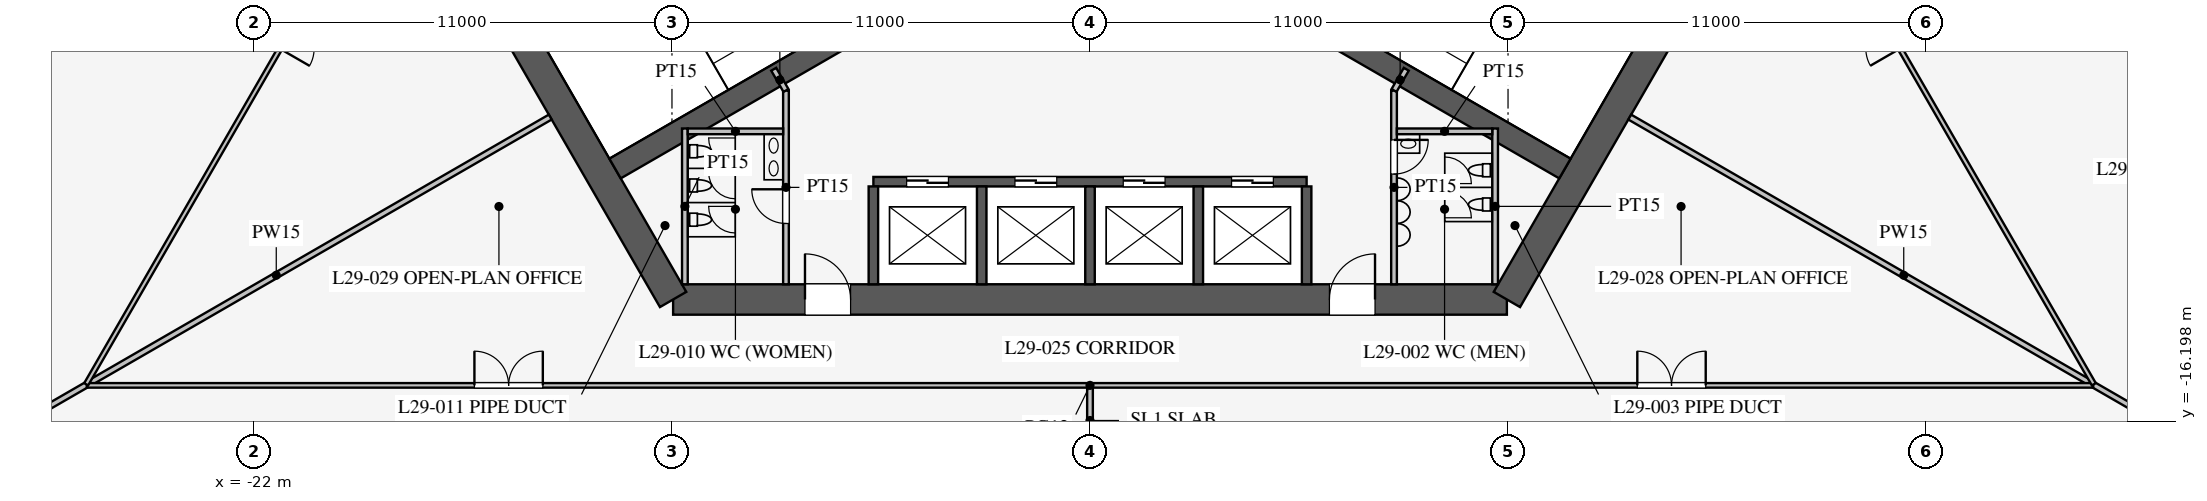
"""IFC4 building model, lengths in metres.
Left out: names, types, materials, properties, quantities, classifications, styles, units other than length and angle.
Written with IfcOpenShell. Run it as: python <this file> out.ifc"""

import sys

from ifc_helpers import new_model, si_unit, direction, frame, frame_2d, origin, place, context, subcontext, project, spatial, rectangle, extrude, element, fill, save


model = new_model("IFC4")
c1 = context("Model", 3, precision=1e-05, world=origin(), true_north=direction((0.0, 1.0)))
c2 = subcontext(c1, "Body", "Model", "MODEL_VIEW")
j1 = project(units=[si_unit("LENGTHUNIT", "METRE"), si_unit("PLANEANGLEUNIT", "RADIAN")], contexts=[c1])
p1 = place(None, origin())
s1 = spatial("IfcSite", under=j1, at=p1, CompositionType="ELEMENT")
p2 = place(p1, origin())
s2 = spatial("IfcBuilding", under=s1, at=p2, CompositionType="ELEMENT")
p3 = place(p2, frame((0.0, 0.0, 128.3)))
s3 = spatial("IfcBuildingStorey", under=s2, at=p3, CompositionType="ELEMENT", Elevation=128.3)
p4 = place(p3, frame((-10.97, -13.0, 0.0), z_axis=(0.0, 0.0, 1.0), x_axis=(1.0, 0.0, 0.0)))
e1 = element("IfcWall", 1, at=p4, inside=s3, PredefinedType="SHEAR", context=c2, shape_type="SweptSolid", body=[
    extrude(rectangle(XDim=21.939, YDim=0.8, at=frame_2d((10.97, 0.0))), origin(), (0.0, 0.0, 1.0), 4.2),
])
p5 = place(p4, frame((17.27, 0.0, 0.0)))
e2 = element("IfcOpeningElement", 2, at=p5, cuts=e1, PredefinedType="OPENING", context=c2, shape_type="SweptSolid", body=[
    extrude(rectangle(XDim=1.2, YDim=2.1, at=frame_2d((0.6, 1.05))), frame((0.0, 0.41, 0.0), z_axis=(0.0, -1.0, 0.0), x_axis=(1.0, 0.0, 0.0)), (0.0, 0.0, 1.0), 0.82),
])
p6 = place(p4, frame((3.47, 0.0, 0.0)))
e3 = element("IfcOpeningElement", 3, at=p6, cuts=e1, PredefinedType="OPENING", context=c2, shape_type="SweptSolid", body=[
    extrude(rectangle(XDim=1.2, YDim=2.1, at=frame_2d((0.6, 1.05))), frame((0.0, 0.41, 0.0), z_axis=(0.0, -1.0, 0.0), x_axis=(1.0, 0.0, 0.0)), (0.0, 0.0, 1.0), 0.82),
])
for number, where, z_axis, x_axis in (
    (4, (10.97, -13.0, 0.0), (0.0, 0.0, 1.0), (0.5, 0.866, 0.0)),
    (5, (-16.743, -3.0, 0.0), (0.0, 0.0, 1.0), (0.5, -0.866, 0.0)),
):
    element("IfcWall", number, at=place(p3, frame(where, z_axis=z_axis, x_axis=x_axis)), inside=s3, PredefinedType="SHEAR", context=c2, shape_type="SweptSolid", body=[
        extrude(rectangle(XDim=11.547, YDim=0.8, at=frame_2d((5.773, 0.0))), origin(), (0.0, 0.0, 1.0), 4.2),
    ])
p7 = place(p3, frame((-5.7, -9.9, 0.0), z_axis=(0.0, 0.0, 1.0), x_axis=(1.0, 0.0, 0.0)))
e6 = element("IfcWall", 6, at=p7, inside=s3, PredefinedType="SHEAR", context=c2, shape_type="SweptSolid", body=[
    extrude(rectangle(XDim=11.4, YDim=0.25, at=frame_2d((5.7, 0.0))), origin(), (0.0, 0.0, 1.0), 4.2),
])
p8 = place(p7, frame((0.875, 0.0, 0.0)))
e7 = element("IfcOpeningElement", 7, at=p8, cuts=e6, PredefinedType="OPENING", context=c2, shape_type="SweptSolid", body=[
    extrude(rectangle(XDim=1.1, YDim=2.2, at=frame_2d((0.55, 1.1))), frame((0.0, 0.135, 0.0), z_axis=(0.0, -1.0, 0.0), x_axis=(1.0, 0.0, 0.0)), (0.0, 0.0, 1.0), 0.27),
])
p9 = place(p7, frame((3.725, 0.0, 0.0)))
e8 = element("IfcOpeningElement", 8, at=p9, cuts=e6, PredefinedType="OPENING", context=c2, shape_type="SweptSolid", body=[
    extrude(rectangle(XDim=1.1, YDim=2.2, at=frame_2d((0.55, 1.1))), frame((0.0, 0.135, 0.0), z_axis=(0.0, -1.0, 0.0), x_axis=(1.0, 0.0, 0.0)), (0.0, 0.0, 1.0), 0.27),
])
p10 = place(p7, frame((6.575, 0.0, 0.0)))
e9 = element("IfcOpeningElement", 9, at=p10, cuts=e6, PredefinedType="OPENING", context=c2, shape_type="SweptSolid", body=[
    extrude(rectangle(XDim=1.1, YDim=2.2, at=frame_2d((0.55, 1.1))), frame((0.0, 0.135, 0.0), z_axis=(0.0, -1.0, 0.0), x_axis=(1.0, 0.0, 0.0)), (0.0, 0.0, 1.0), 0.27),
])
p11 = place(p7, frame((9.425, 0.0, 0.0)))
e10 = element("IfcOpeningElement", 10, at=p11, cuts=e6, PredefinedType="OPENING", context=c2, shape_type="SweptSolid", body=[
    extrude(rectangle(XDim=1.1, YDim=2.2, at=frame_2d((0.55, 1.1))), frame((0.0, 0.135, 0.0), z_axis=(0.0, -1.0, 0.0), x_axis=(1.0, 0.0, 0.0)), (0.0, 0.0, 1.0), 0.27),
])
for number, where, z_axis, x_axis in (
    (11, (-5.7, -10.025, 0.0), (0.0, 0.0, 1.0), (0.0, -1.0, 0.0)),
    (12, (-2.85, -10.025, 0.0), (0.0, 0.0, 1.0), (0.0, -1.0, 0.0)),
    (13, (0.0, -10.025, 0.0), (0.0, 0.0, 1.0), (0.0, -1.0, 0.0)),
    (14, (2.85, -10.025, 0.0), (0.0, 0.0, 1.0), (0.0, -1.0, 0.0)),
    (15, (5.7, -10.025, 0.0), (0.0, 0.0, 1.0), (0.0, -1.0, 0.0)),
):
    element("IfcWall", number, at=place(p3, frame(where, z_axis=z_axis, x_axis=x_axis)), inside=s3, PredefinedType="SHEAR", context=c2, shape_type="SweptSolid", body=[
        extrude(rectangle(XDim=2.575, YDim=0.25, at=frame_2d((1.288, 0.0))), origin(), (0.0, 0.0, 1.0), 4.2),
    ])
for number, where, z_axis, x_axis in (
    (16, (4.638, -5.016, 0.0), (0.0, 0.0, 1.0), (0.866, -0.5, 0.0)),
    (17, (-4.638, -5.016, 0.0), (0.0, 0.0, 1.0), (-0.866, -0.5, 0.0)),
):
    element("IfcWall", number, at=place(p3, frame(where, z_axis=z_axis, x_axis=x_axis)), inside=s3, PredefinedType="SHEAR", context=c2, shape_type="SweptSolid", body=[
        extrude(rectangle(XDim=9.075, YDim=0.6, at=frame_2d((4.538, 0.0))), origin(), (0.0, 0.0, 1.0), 4.2),
    ])
p12 = place(p3, frame((8.0, -7.5, 0.0), z_axis=(0.0, 0.0, 1.0), x_axis=(0.0, -1.0, 0.0)))
e18 = element("IfcWall", 18, at=p12, inside=s3, PredefinedType="PARTITIONING", context=c2, shape_type="SweptSolid", body=[
    extrude(rectangle(XDim=5.1, YDim=0.15, at=frame_2d((2.55, 0.0))), origin(), (0.0, 0.0, 1.0), 4.0),
])
p13 = place(p12, frame((1.3, 0.0, 0.0)))
e19 = element("IfcOpeningElement", 19, at=p13, cuts=e18, PredefinedType="OPENING", context=c2, shape_type="SweptSolid", body=[
    extrude(rectangle(XDim=0.9, YDim=2.1, at=frame_2d((0.45, 1.05))), frame((0.0, 0.085, 0.0), z_axis=(0.0, -1.0, 0.0), x_axis=(1.0, 0.0, 0.0)), (0.0, 0.0, 1.0), 0.17),
])
p14 = place(p3, frame((-8.0, -7.5, 0.0), z_axis=(0.0, 0.0, 1.0), x_axis=(0.0, -1.0, 0.0)))
e20 = element("IfcWall", 20, at=p14, inside=s3, PredefinedType="PARTITIONING", context=c2, shape_type="SweptSolid", body=[
    extrude(rectangle(XDim=5.1, YDim=0.15, at=frame_2d((2.55, 0.0))), origin(), (0.0, 0.0, 1.0), 4.0),
])
p15 = place(p14, frame((2.6, 0.0, 0.0)))
e21 = element("IfcOpeningElement", 21, at=p15, cuts=e20, PredefinedType="OPENING", context=c2, shape_type="SweptSolid", body=[
    extrude(rectangle(XDim=0.9, YDim=2.1, at=frame_2d((0.45, 1.05))), frame((0.0, 0.085, 0.0), z_axis=(0.0, -1.0, 0.0), x_axis=(1.0, 0.0, 0.0)), (0.0, 0.0, 1.0), 0.17),
])
for number, where, z_axis, x_axis in (
    (22, (8.0, -7.5, 0.0), (0.0, 0.0, 1.0), (0.5, 0.866, 0.0)),
    (23, (-8.0, -7.5, 0.0), (0.0, 0.0, 1.0), (-0.5, 0.866, 0.0)),
):
    element("IfcWall", number, at=place(p3, frame(where, z_axis=z_axis, x_axis=x_axis)), inside=s3, PredefinedType="PARTITIONING", context=c2, shape_type="SweptSolid", body=[
        extrude(rectangle(XDim=0.645, YDim=0.15, at=frame_2d((0.323, 0.0))), origin(), (0.0, 0.0, 1.0), 4.0),
    ])
p16 = place(p3, frame((10.66, -8.5, 0.0), z_axis=(0.0, 0.0, 1.0), x_axis=(0.0, -1.0, 0.0)))
e24 = element("IfcWall", 24, at=p16, inside=s3, PredefinedType="PARTITIONING", context=c2, shape_type="SweptSolid", body=[
    extrude(rectangle(XDim=4.1, YDim=0.15, at=frame_2d((2.05, 0.0))), origin(), (0.0, 0.0, 1.0), 4.0),
])
p17 = place(p3, frame((8.075, -8.575, 0.0), z_axis=(0.0, 0.0, 1.0), x_axis=(1.0, 0.0, 0.0)))
e25 = element("IfcWall", 25, at=p17, inside=s3, PredefinedType="PARTITIONING", context=c2, shape_type="SweptSolid", body=[
    extrude(rectangle(XDim=2.51, YDim=0.15, at=frame_2d((1.255, 0.0))), origin(), (0.0, 0.0, 1.0), 4.0),
])
p18 = place(p3, frame((-10.66, -8.5, 0.0), z_axis=(0.0, 0.0, 1.0), x_axis=(0.0, -1.0, 0.0)))
e26 = element("IfcWall", 26, at=p18, inside=s3, PredefinedType="PARTITIONING", context=c2, shape_type="SweptSolid", body=[
    extrude(rectangle(XDim=4.1, YDim=0.15, at=frame_2d((2.05, 0.0))), origin(), (0.0, 0.0, 1.0), 4.0),
])
p19 = place(p3, frame((-8.075, -8.575, 0.0), z_axis=(0.0, 0.0, 1.0), x_axis=(-1.0, 0.0, 0.0)))
e27 = element("IfcWall", 27, at=p19, inside=s3, PredefinedType="PARTITIONING", context=c2, shape_type="SweptSolid", body=[
    extrude(rectangle(XDim=2.51, YDim=0.15, at=frame_2d((1.255, 0.0))), origin(), (0.0, 0.0, 1.0), 4.0),
])
for number, where, z_axis, x_axis in (
    (28, (14.203, -8.2, 0.0), (0.0, 0.0, 1.0), (0.866, -0.5, 0.0)),
    (29, (-14.203, -8.2, 0.0), (0.0, 0.0, 1.0), (-0.866, -0.5, 0.0)),
):
    element("IfcWall", number, at=place(p3, frame(where, z_axis=z_axis, x_axis=x_axis)), inside=s3, PredefinedType="PARTITIONING", context=c2, shape_type="SweptSolid", body=[
        extrude(rectangle(XDim=16.65, YDim=0.15, at=frame_2d((8.325, 0.0))), origin(), (0.0, 0.0, 1.0), 2.3),
    ])
p20 = place(p3, frame((0.0, -15.32, 0.0), z_axis=(0.0, 0.0, 1.0), x_axis=(0.0, -1.0, 0.0)))
e30 = element("IfcWall", 30, at=p20, inside=s3, PredefinedType="PARTITIONING", context=c2, shape_type="SweptSolid", body=[
    extrude(rectangle(XDim=9.65, YDim=0.15, at=frame_2d((4.825, 0.0))), origin(), (0.0, 0.0, 1.0), 3.2),
])
p21 = place(p3, frame((-26.398, -15.26, 0.0), z_axis=(0.0, 0.0, 1.0), x_axis=(1.0, 0.0, 0.0)))
e31 = element("IfcWall", 31, at=p21, inside=s3, PredefinedType="PARTITIONING", context=c2, shape_type="SweptSolid", body=[
    extrude(rectangle(XDim=52.796, YDim=0.12, at=frame_2d((26.398, 0.0))), origin(), (0.0, 0.0, 1.0), 2.9),
])
p22 = place(p21, frame((10.2, 0.0, 0.15)))
e32 = element("IfcOpeningElement", 32, at=p22, cuts=e31, PredefinedType="OPENING", context=c2, shape_type="SweptSolid", body=[
    extrude(rectangle(XDim=1.8, YDim=2.1, at=frame_2d((0.9, 1.05))), frame((0.0, 0.07, 0.0), z_axis=(0.0, -1.0, 0.0), x_axis=(1.0, 0.0, 0.0)), (0.0, 0.0, 1.0), 0.14),
])
p23 = place(p21, frame((40.8, 0.0, 0.15)))
e33 = element("IfcOpeningElement", 33, at=p23, cuts=e31, PredefinedType="OPENING", context=c2, shape_type="SweptSolid", body=[
    extrude(rectangle(XDim=1.8, YDim=2.1, at=frame_2d((0.9, 1.05))), frame((0.0, 0.07, 0.0), z_axis=(0.0, -1.0, 0.0), x_axis=(1.0, 0.0, 0.0)), (0.0, 0.0, 1.0), 0.14),
])
p24 = place(p3, frame((26.415, -15.231, 0.0), z_axis=(0.0, 0.0, 1.0), x_axis=(-0.50000091641, 0.866024874695, 0.0)))
e34 = element("IfcWall", 34, at=p24, inside=s3, PredefinedType="PARTITIONING", context=c2, shape_type="SweptSolid", body=[
    extrude(rectangle(XDim=52.796, YDim=0.12, at=frame_2d((26.398, 0.0))), origin(), (0.0, 0.0, 1.0), 2.9),
])
p25 = place(p24, frame((10.2, 0.0, 0.15)))
e35 = element("IfcOpeningElement", 35, at=p25, cuts=e34, PredefinedType="OPENING", context=c2, shape_type="SweptSolid", body=[
    extrude(rectangle(XDim=1.8, YDim=2.1, at=frame_2d((0.9, 1.05))), frame((0.0, 0.07, 0.0), z_axis=(0.0, -1.0, 0.0), x_axis=(1.0, 0.0, 0.0)), (0.0, 0.0, 1.0), 0.14),
])
p26 = place(p24, frame((40.8, 0.0, 0.15)))
e36 = element("IfcOpeningElement", 36, at=p26, cuts=e34, PredefinedType="OPENING", context=c2, shape_type="SweptSolid", body=[
    extrude(rectangle(XDim=1.8, YDim=2.1, at=frame_2d((0.9, 1.05))), frame((0.0, 0.07, 0.0), z_axis=(0.0, -1.0, 0.0), x_axis=(1.0, 0.0, 0.0)), (0.0, 0.0, 1.0), 0.14),
])
p27 = place(p3, frame((-0.016, 30.491, 0.0), z_axis=(0.0, 0.0, 1.0), x_axis=(-0.50000091641, -0.866024874695, 0.0)))
e37 = element("IfcWall", 37, at=p27, inside=s3, PredefinedType="PARTITIONING", context=c2, shape_type="SweptSolid", body=[
    extrude(rectangle(XDim=52.796, YDim=0.12, at=frame_2d((26.398, 0.0))), origin(), (0.0, 0.0, 1.0), 2.9),
])
p28 = place(p27, frame((10.2, 0.0, 0.15)))
e38 = element("IfcOpeningElement", 38, at=p28, cuts=e37, PredefinedType="OPENING", context=c2, shape_type="SweptSolid", body=[
    extrude(rectangle(XDim=1.8, YDim=2.1, at=frame_2d((0.9, 1.05))), frame((0.0, 0.07, 0.0), z_axis=(0.0, -1.0, 0.0), x_axis=(1.0, 0.0, 0.0)), (0.0, 0.0, 1.0), 0.14),
])
p29 = place(p27, frame((40.8, 0.0, 0.15)))
e39 = element("IfcOpeningElement", 39, at=p29, cuts=e37, PredefinedType="OPENING", context=c2, shape_type="SweptSolid", body=[
    extrude(rectangle(XDim=1.8, YDim=2.1, at=frame_2d((0.9, 1.05))), frame((0.0, 0.07, 0.0), z_axis=(0.0, -1.0, 0.0), x_axis=(1.0, 0.0, 0.0)), (0.0, 0.0, 1.0), 0.14),
])
p30 = place(p13, origin())
e40 = element("IfcDoor", 40, at=p30, inside=s3, OperationType="SINGLE_SWING_LEFT", PredefinedType="DOOR", context=c2, shape_type="SweptSolid", body=[
    extrude(rectangle(XDim=0.9, YDim=2.1, at=frame_2d((0.45, 1.05))), frame((0.0, 0.025, 0.0), z_axis=(0.0, -1.0, 0.0), x_axis=(1.0, 0.0, 0.0)), (0.0, 0.0, 1.0), 0.05),
])
fill(e19, e40)
p31 = place(p15, frame((0.9, 0.0, 0.0), z_axis=(0.0, 0.0, 1.0), x_axis=(-1.0, 0.0, 0.0)))
e41 = element("IfcDoor", 41, at=p31, inside=s3, OperationType="SINGLE_SWING_RIGHT", PredefinedType="DOOR", context=c2, shape_type="SweptSolid", body=[
    extrude(rectangle(XDim=0.9, YDim=2.1, at=frame_2d((0.45, 1.05))), frame((0.0, 0.025, 0.0), z_axis=(0.0, -1.0, 0.0), x_axis=(1.0, 0.0, 0.0)), (0.0, 0.0, 1.0), 0.05),
])
fill(e21, e41)
p32 = place(p5, origin())
e42 = element("IfcDoor", 42, at=p32, inside=s3, OperationType="SINGLE_SWING_RIGHT", PredefinedType="DOOR", context=c2, shape_type="SweptSolid", body=[
    extrude(rectangle(XDim=1.2, YDim=2.1, at=frame_2d((0.6, 1.05))), frame((0.0, 0.025, 0.0), z_axis=(0.0, -1.0, 0.0), x_axis=(1.0, 0.0, 0.0)), (0.0, 0.0, 1.0), 0.05),
])
fill(e2, e42)
p33 = place(p6, origin())
e43 = element("IfcDoor", 43, at=p33, inside=s3, OperationType="SINGLE_SWING_LEFT", PredefinedType="DOOR", context=c2, shape_type="SweptSolid", body=[
    extrude(rectangle(XDim=1.2, YDim=2.1, at=frame_2d((0.6, 1.05))), frame((0.0, 0.025, 0.0), z_axis=(0.0, -1.0, 0.0), x_axis=(1.0, 0.0, 0.0)), (0.0, 0.0, 1.0), 0.05),
])
fill(e3, e43)
p34 = place(p22, origin())
e44 = element("IfcDoor", 44, at=p34, inside=s3, OperationType="DOUBLE_DOOR_SINGLE_SWING", PredefinedType="DOOR", context=c2, shape_type="SweptSolid", body=[
    extrude(rectangle(XDim=1.8, YDim=2.1, at=frame_2d((0.9, 1.05))), frame((0.0, 0.025, 0.0), z_axis=(0.0, -1.0, 0.0), x_axis=(1.0, 0.0, 0.0)), (0.0, 0.0, 1.0), 0.05),
])
fill(e32, e44)
p35 = place(p23, origin())
e45 = element("IfcDoor", 45, at=p35, inside=s3, OperationType="DOUBLE_DOOR_SINGLE_SWING", PredefinedType="DOOR", context=c2, shape_type="SweptSolid", body=[
    extrude(rectangle(XDim=1.8, YDim=2.1, at=frame_2d((0.9, 1.05))), frame((0.0, 0.025, 0.0), z_axis=(0.0, -1.0, 0.0), x_axis=(1.0, 0.0, 0.0)), (0.0, 0.0, 1.0), 0.05),
])
fill(e33, e45)
p36 = place(p8, origin())
e46 = element("IfcDoor", 46, at=p36, inside=s3, OperationType="DOUBLE_DOOR_SLIDING", PredefinedType="DOOR", context=c2, shape_type="SweptSolid", body=[
    extrude(rectangle(XDim=1.1, YDim=2.2, at=frame_2d((0.55, 1.1))), frame((0.0, 0.025, 0.0), z_axis=(0.0, -1.0, 0.0), x_axis=(1.0, 0.0, 0.0)), (0.0, 0.0, 1.0), 0.05),
])
fill(e7, e46)
p37 = place(p9, origin())
e47 = element("IfcDoor", 47, at=p37, inside=s3, OperationType="DOUBLE_DOOR_SLIDING", PredefinedType="DOOR", context=c2, shape_type="SweptSolid", body=[
    extrude(rectangle(XDim=1.1, YDim=2.2, at=frame_2d((0.55, 1.1))), frame((0.0, 0.025, 0.0), z_axis=(0.0, -1.0, 0.0), x_axis=(1.0, 0.0, 0.0)), (0.0, 0.0, 1.0), 0.05),
])
fill(e8, e47)
p38 = place(p10, origin())
e48 = element("IfcDoor", 48, at=p38, inside=s3, OperationType="DOUBLE_DOOR_SLIDING", PredefinedType="DOOR", context=c2, shape_type="SweptSolid", body=[
    extrude(rectangle(XDim=1.1, YDim=2.2, at=frame_2d((0.55, 1.1))), frame((0.0, 0.025, 0.0), z_axis=(0.0, -1.0, 0.0), x_axis=(1.0, 0.0, 0.0)), (0.0, 0.0, 1.0), 0.05),
])
fill(e9, e48)
p39 = place(p11, origin())
e49 = element("IfcDoor", 49, at=p39, inside=s3, OperationType="DOUBLE_DOOR_SLIDING", PredefinedType="DOOR", context=c2, shape_type="SweptSolid", body=[
    extrude(rectangle(XDim=1.1, YDim=2.2, at=frame_2d((0.55, 1.1))), frame((0.0, 0.025, 0.0), z_axis=(0.0, -1.0, 0.0), x_axis=(1.0, 0.0, 0.0)), (0.0, 0.0, 1.0), 0.05),
])
fill(e10, e49)
save(model, sys.argv[1])
